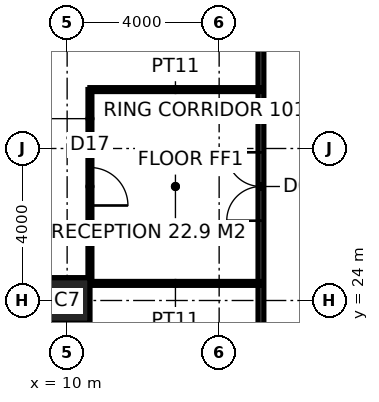
"""IFC4 building model, lengths in metres.
Left out: names, types, materials, properties, quantities, classifications, styles, units other than length and angle.
Written with IfcOpenShell. Run it as: python <this file> out.ifc"""

import sys

from ifc_helpers import new_model, si_unit, direction, frame, frame_2d, origin, origin_2d, place, context, subcontext, project, spatial, rectangle, hollow_rectangle, extrude, element, fill, save


model = new_model("IFC4")
c1 = context("Model", 3, precision=1e-05, world=origin(), true_north=direction((0.0, 1.0)))
c2 = subcontext(c1, "Body", "Model", "MODEL_VIEW")
j1 = project(units=[si_unit("LENGTHUNIT", "METRE"), si_unit("PLANEANGLEUNIT", "RADIAN")], contexts=[c1])
p1 = place(None, origin())
s1 = spatial("IfcSite", under=j1, at=p1, CompositionType="ELEMENT")
p2 = place(p1, origin())
s2 = spatial("IfcBuilding", under=s1, at=p2, CompositionType="ELEMENT")
p3 = place(p2, frame((0.0, 0.0, 51.0)))
s3 = spatial("IfcBuildingStorey", under=s2, at=p3, CompositionType="ELEMENT", Elevation=51.0)
p4 = place(p3, frame((10.0, 24.0, 0.0), z_axis=(0.0, 0.0, 1.0), x_axis=(1.0, 0.0, 0.0)))
e1 = element("IfcColumn", 1, at=p4, inside=s3, PredefinedType="COLUMN", context=c2, shape_type="SweptSolid", body=[
    extrude(hollow_rectangle(XDim=1.2, YDim=1.2, WallThickness=0.1, at=origin_2d()), origin(), (0.0, 0.0, 1.0), 4.0),
])
p5 = place(p3, frame((15.1, 15.225, 0.0), z_axis=(0.0, 0.0, 1.0), x_axis=(0.0, 1.0, 0.0)))
e2 = element("IfcWall", 2, at=p5, inside=s3, PredefinedType="PARTITIONING", context=c2, shape_type="SweptSolid", body=[
    extrude(rectangle(XDim=23.55, YDim=0.15, at=frame_2d((11.775, 0.0))), origin(), (0.0, 0.0, 1.0), 3.85),
])
p6 = place(p5, frame((10.875, 0.0, 0.0)))
e3 = element("IfcOpeningElement", 3, at=p6, cuts=e2, PredefinedType="OPENING", context=c2, shape_type="SweptSolid", body=[
    extrude(rectangle(XDim=1.8, YDim=2.4, at=frame_2d((0.9, 1.2))), frame((0.0, 0.085, 0.0), z_axis=(0.0, -1.0, 0.0), x_axis=(1.0, 0.0, 0.0)), (0.0, 0.0, 1.0), 0.17),
])
p7 = place(p3, frame((15.1, 29.55, 0.0), z_axis=(0.0, 0.0, 1.0), x_axis=(-1.0, 0.0, 0.0)))
e4 = element("IfcWall", 4, at=p7, inside=s3, PredefinedType="PARTITIONING", context=c2, shape_type="SweptSolid", body=[
    extrude(rectangle(XDim=4.5, YDim=0.1, at=frame_2d((2.25, 0.0))), origin(), (0.0, 0.0, 1.0), 3.85),
])
p8 = place(p3, frame((10.6, 29.55, 0.0), z_axis=(0.0, 0.0, 1.0), x_axis=(0.0, -1.0, 0.0)))
e5 = element("IfcWall", 5, at=p8, inside=s3, PredefinedType="PARTITIONING", context=c2, shape_type="SweptSolid", body=[
    extrude(rectangle(XDim=5.1, YDim=0.1, at=frame_2d((2.55, 0.0))), origin(), (0.0, 0.0, 1.0), 3.85),
])
p9 = place(p8, frame((2.05, 0.0, 0.0)))
e6 = element("IfcOpeningElement", 6, at=p9, cuts=e5, PredefinedType="OPENING", context=c2, shape_type="SweptSolid", body=[
    extrude(rectangle(XDim=1.0, YDim=2.2, at=frame_2d((0.5, 1.1))), frame((0.0, 0.06, 0.0), z_axis=(0.0, -1.0, 0.0), x_axis=(1.0, 0.0, 0.0)), (0.0, 0.0, 1.0), 0.12),
])
p10 = place(p3, frame((10.6, 24.45, 0.0), z_axis=(0.0, 0.0, 1.0), x_axis=(1.0, 0.0, 0.0)))
e7 = element("IfcWall", 7, at=p10, inside=s3, PredefinedType="PARTITIONING", context=c2, shape_type="SweptSolid", body=[
    extrude(rectangle(XDim=4.5, YDim=0.1, at=frame_2d((2.25, 0.0))), origin(), (0.0, 0.0, 1.0), 2.95),
])
p11 = place(p6, origin())
e8 = element("IfcDoor", 8, at=p11, inside=s3, OperationType="DOUBLE_DOOR_DOUBLE_SWING", PredefinedType="DOOR", context=c2, shape_type="SweptSolid", body=[
    extrude(rectangle(XDim=1.8, YDim=2.4, at=frame_2d((0.9, 1.2))), frame((0.0, 0.025, 0.0), z_axis=(0.0, -1.0, 0.0), x_axis=(1.0, 0.0, 0.0)), (0.0, 0.0, 1.0), 0.05),
])
fill(e3, e8)
p12 = place(p9, origin())
e9 = element("IfcDoor", 9, at=p12, inside=s3, OperationType="SINGLE_SWING_RIGHT", PredefinedType="DOOR", context=c2, shape_type="SweptSolid", body=[
    extrude(rectangle(XDim=1.0, YDim=2.2, at=frame_2d((0.5, 1.1))), frame((0.0, 0.025, 0.0), z_axis=(0.0, -1.0, 0.0), x_axis=(1.0, 0.0, 0.0)), (0.0, 0.0, 1.0), 0.05),
])
fill(e6, e9)
save(model, sys.argv[1])
